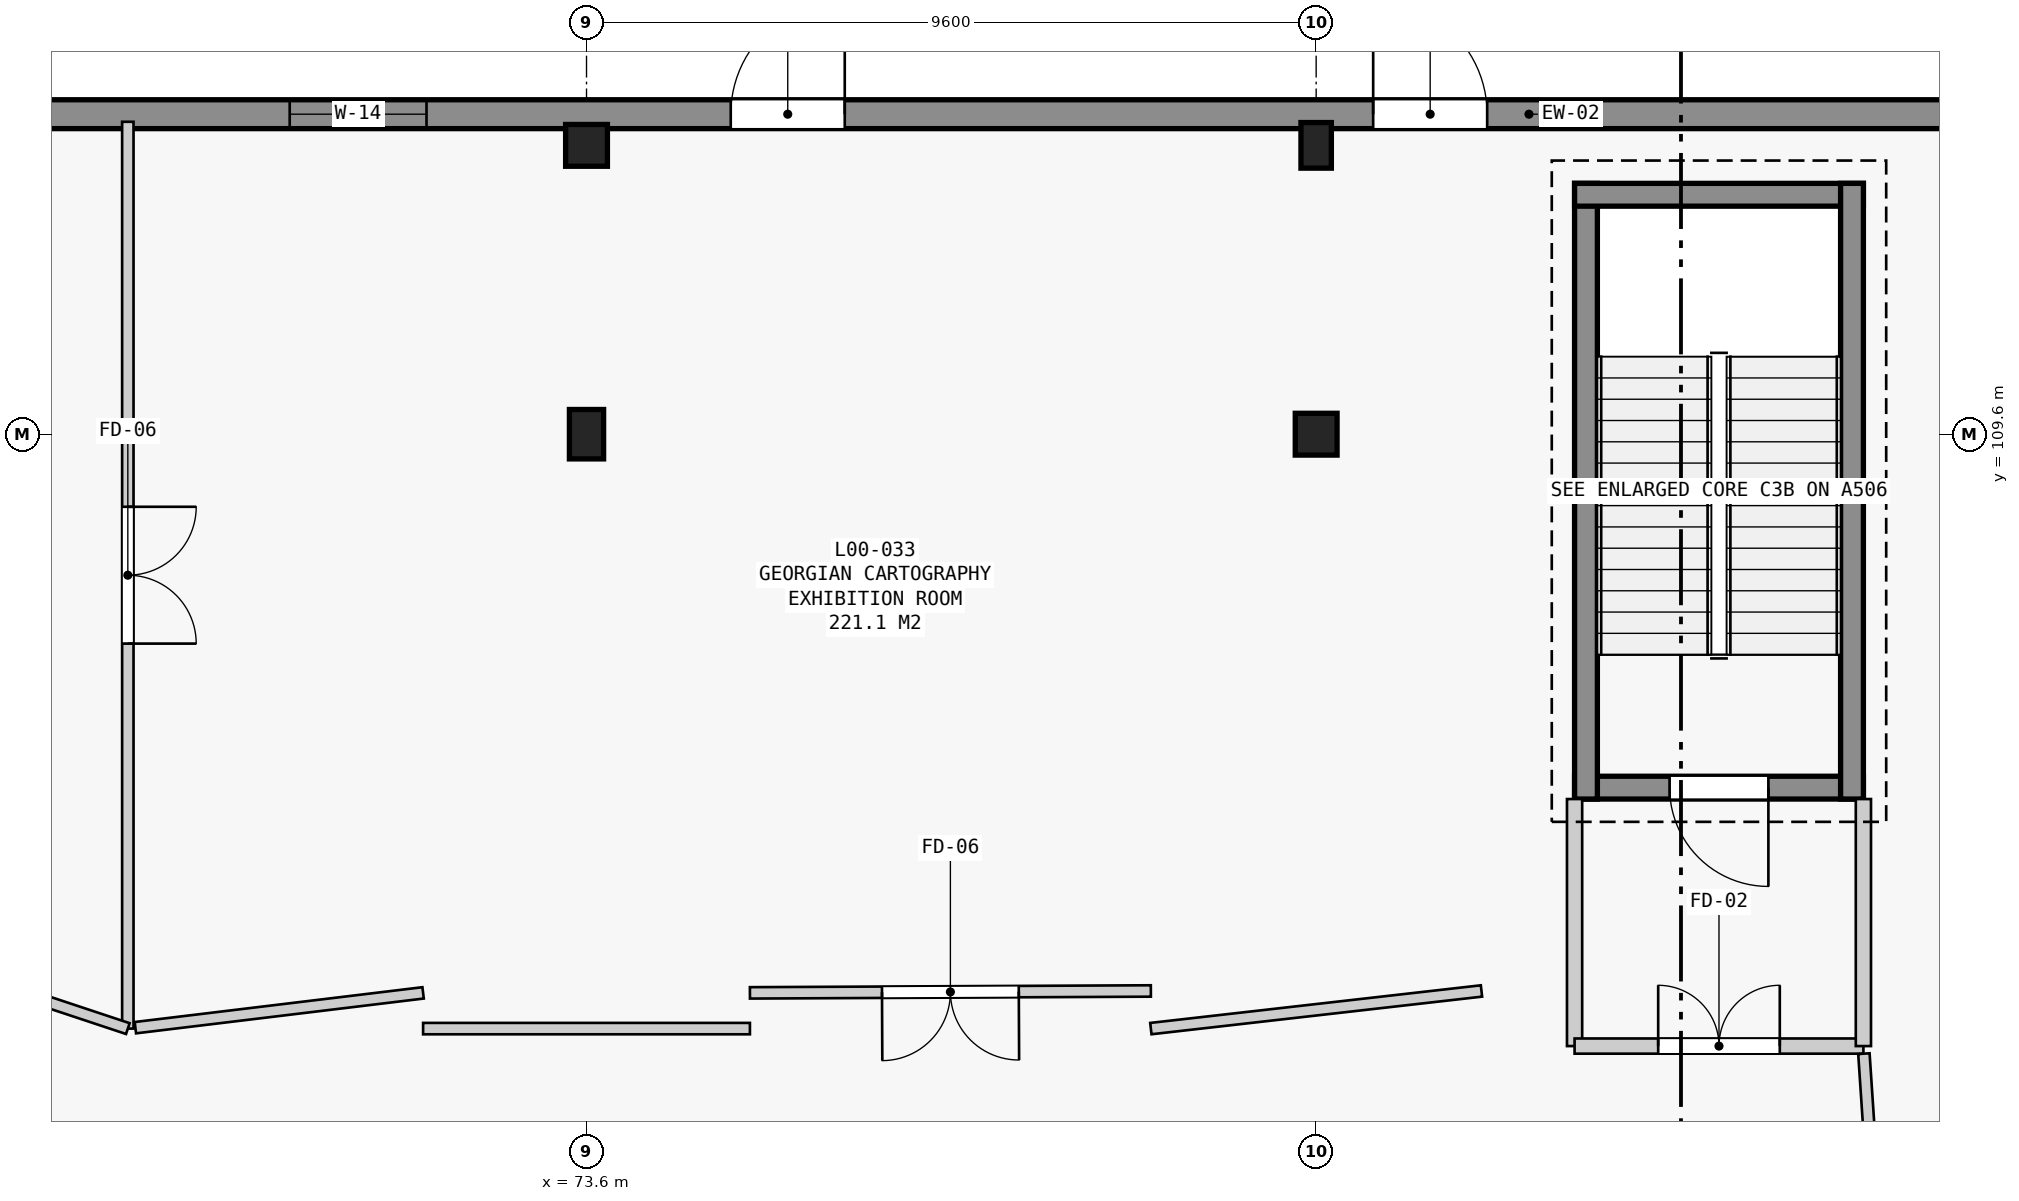
"""IFC4 building model, lengths in metres.
Left out: names, types, materials, properties, quantities, classifications, styles, units other than length and angle.
Written with IfcOpenShell. Run it as: python <this file> out.ifc"""

import sys

from ifc_helpers import new_model, si_unit, direction, frame, frame_2d, origin, origin_2d, place, context, subcontext, project, spatial, rectangle, extrude, element, fill, save


model = new_model("IFC4")
c1 = context("Model", 3, precision=1e-05, world=origin(), true_north=direction((0.0, 1.0)))
c2 = subcontext(c1, "Body", "Model", "MODEL_VIEW")
j1 = project(units=[si_unit("LENGTHUNIT", "METRE"), si_unit("PLANEANGLEUNIT", "RADIAN")], contexts=[c1])
p1 = place(None, origin())
s1 = spatial("IfcSite", under=j1, at=p1, CompositionType="ELEMENT")
p2 = place(p1, origin())
s2 = spatial("IfcBuilding", under=s1, at=p2, CompositionType="ELEMENT")
p3 = place(p2, origin())
s3 = spatial("IfcBuildingStorey", under=s2, at=p3, CompositionType="ELEMENT", Elevation=0.0)
p4 = place(p3, frame((73.6, 109.6, 0.0), z_axis=(0.0, 0.0, 1.0), x_axis=(1.0, 0.0, 0.0)))
e1 = element("IfcColumn", 1, at=p4, inside=s3, PredefinedType="COLUMN", context=c2, shape_type="SweptSolid", body=[
    extrude(rectangle(XDim=0.45, YDim=0.65, at=origin_2d()), origin(), (0.0, 0.0, 1.0), 5.4),
])
for number, where, z_axis, x_axis in (
    (2, (73.6, 113.4, 0.0), (0.0, 0.0, 1.0), (1.0, 0.0, 0.0)),
    (3, (83.2, 109.6, 0.0), (0.0, 0.0, 1.0), (1.0, 0.0, 0.0)),
):
    element("IfcColumn", number, at=place(p3, frame(where, z_axis=z_axis, x_axis=x_axis)), inside=s3, PredefinedType="COLUMN", context=c2, shape_type="SweptSolid", body=[
        extrude(rectangle(XDim=0.55, YDim=0.55, at=origin_2d()), origin(), (0.0, 0.0, 1.0), 5.4),
    ])
p5 = place(p3, frame((83.2, 113.4, 0.0), z_axis=(0.0, 0.0, 1.0), x_axis=(1.0, 0.0, 0.0)))
e4 = element("IfcColumn", 4, at=p5, inside=s3, PredefinedType="COLUMN", context=c2, shape_type="SweptSolid", body=[
    extrude(rectangle(XDim=0.4, YDim=0.6, at=origin_2d()), origin(), (0.0, 0.0, 1.0), 5.4),
])
p6 = place(p3, frame((46.29, 113.81, 0.0), z_axis=(0.0, 0.0, 1.0), x_axis=(1.0, 0.0, 0.0)))
e5 = element("IfcWall", 5, at=p6, inside=s3, PredefinedType="STANDARD", context=c2, shape_type="SweptSolid", body=[
    extrude(rectangle(XDim=84.72, YDim=0.38, at=frame_2d((42.36, 0.0))), origin(), (0.0, 0.0, 1.0), 5.12),
])
p7 = place(p6, frame((5.565, 0.0, 0.0)))
e6 = element("IfcOpeningElement", 6, at=p7, cuts=e5, PredefinedType="OPENING", context=c2, shape_type="SweptSolid", body=[
    extrude(rectangle(XDim=1.5, YDim=2.3, at=frame_2d((0.75, 1.15))), frame((0.0, 0.2, 0.0), z_axis=(0.0, -1.0, 0.0), x_axis=(1.0, 0.0, 0.0)), (0.0, 0.0, 1.0), 0.4),
])
p8 = place(p6, frame((29.208, 0.0, 0.0)))
e7 = element("IfcOpeningElement", 7, at=p8, cuts=e5, PredefinedType="OPENING", context=c2, shape_type="SweptSolid", body=[
    extrude(rectangle(XDim=1.5, YDim=2.3, at=frame_2d((0.75, 1.15))), frame((0.0, 0.2, 0.0), z_axis=(0.0, -1.0, 0.0), x_axis=(1.0, 0.0, 0.0)), (0.0, 0.0, 1.0), 0.4),
])
p9 = place(p6, frame((58.012, 0.0, 0.0)))
e8 = element("IfcOpeningElement", 8, at=p9, cuts=e5, PredefinedType="OPENING", context=c2, shape_type="SweptSolid", body=[
    extrude(rectangle(XDim=1.5, YDim=2.3, at=frame_2d((0.75, 1.15))), frame((0.0, 0.2, 0.0), z_axis=(0.0, -1.0, 0.0), x_axis=(1.0, 0.0, 0.0)), (0.0, 0.0, 1.0), 0.4),
])
p10 = place(p6, frame((23.405, 0.0, 1.05)))
e9 = element("IfcOpeningElement", 9, at=p10, cuts=e5, PredefinedType="OPENING", context=c2, shape_type="SweptSolid", body=[
    extrude(rectangle(XDim=1.8, YDim=2.1, at=frame_2d((0.9, 1.05))), frame((0.0, 0.2, 0.0), z_axis=(0.0, -1.0, 0.0), x_axis=(1.0, 0.0, 0.0)), (0.0, 0.0, 1.0), 0.4),
])
p11 = place(p6, frame((52.465, 0.0, 1.65)))
e10 = element("IfcOpeningElement", 10, at=p11, cuts=e5, PredefinedType="OPENING", context=c2, shape_type="SweptSolid", body=[
    extrude(rectangle(XDim=2.1, YDim=1.6, at=frame_2d((1.05, 0.8))), frame((0.0, 0.2, 0.0), z_axis=(0.0, -1.0, 0.0), x_axis=(1.0, 0.0, 0.0)), (0.0, 0.0, 1.0), 0.4),
])
p12 = place(p6, frame((11.66, 0.0, 0.0)))
e11 = element("IfcOpeningElement", 11, at=p12, cuts=e5, PredefinedType="OPENING", context=c2, shape_type="SweptSolid", body=[
    extrude(rectangle(XDim=1.5, YDim=2.3, at=frame_2d((0.75, 1.15))), frame((0.0, 0.2, 0.0), z_axis=(0.0, -1.0, 0.0), x_axis=(1.0, 0.0, 0.0)), (0.0, 0.0, 1.0), 0.4),
])
p13 = place(p6, frame((37.66, 0.0, 0.0)))
e12 = element("IfcOpeningElement", 12, at=p13, cuts=e5, PredefinedType="OPENING", context=c2, shape_type="SweptSolid", body=[
    extrude(rectangle(XDim=1.5, YDim=2.3, at=frame_2d((0.75, 1.15))), frame((0.0, 0.2, 0.0), z_axis=(0.0, -1.0, 0.0), x_axis=(1.0, 0.0, 0.0)), (0.0, 0.0, 1.0), 0.4),
])
p14 = place(p3, frame((90.4, 104.95, 0.0), z_axis=(0.0, 0.0, 1.0), x_axis=(-1.0, 0.0, 0.0)))
e13 = element("IfcWall", 13, at=p14, inside=s3, PredefinedType="SHEAR", context=c2, shape_type="SweptSolid", body=[
    extrude(rectangle(XDim=3.8, YDim=0.3, at=frame_2d((1.9, 0.0))), origin(), (0.0, 0.0, 1.0), 5.12),
])
p15 = place(p14, frame((1.25, 0.0, 0.0)))
e14 = element("IfcOpeningElement", 14, at=p15, cuts=e13, PredefinedType="OPENING", context=c2, shape_type="SweptSolid", body=[
    extrude(rectangle(XDim=1.3, YDim=2.2, at=frame_2d((0.65, 1.1))), frame((0.0, 0.16, 0.0), z_axis=(0.0, -1.0, 0.0), x_axis=(1.0, 0.0, 0.0)), (0.0, 0.0, 1.0), 0.32),
])
p16 = place(p3, frame((86.75, 104.8, 0.0), z_axis=(0.0, 0.0, 1.0), x_axis=(0.0, 1.0, 0.0)))
e15 = element("IfcWall", 15, at=p16, inside=s3, PredefinedType="SHEAR", context=c2, shape_type="SweptSolid", body=[
    extrude(rectangle(XDim=8.1, YDim=0.3, at=frame_2d((4.05, 0.0))), origin(), (0.0, 0.0, 1.0), 5.12),
])
p17 = place(p3, frame((86.6, 112.75, 0.0), z_axis=(0.0, 0.0, 1.0), x_axis=(1.0, 0.0, 0.0)))
e16 = element("IfcWall", 16, at=p17, inside=s3, PredefinedType="SHEAR", context=c2, shape_type="SweptSolid", body=[
    extrude(rectangle(XDim=3.8, YDim=0.3, at=frame_2d((1.9, 0.0))), origin(), (0.0, 0.0, 1.0), 5.12),
])
p18 = place(p3, frame((90.25, 112.9, 0.0), z_axis=(0.0, 0.0, 1.0), x_axis=(0.0, -1.0, 0.0)))
e17 = element("IfcWall", 17, at=p18, inside=s3, PredefinedType="SHEAR", context=c2, shape_type="SweptSolid", body=[
    extrude(rectangle(XDim=8.1, YDim=0.3, at=frame_2d((4.05, 0.0))), origin(), (0.0, 0.0, 1.0), 5.12),
])
p19 = place(p3, frame((86.6, 104.8, 0.0), z_axis=(0.0, 0.0, 1.0), x_axis=(0.0, -1.0, 0.0)))
e18 = element("IfcWall", 18, at=p19, inside=s3, PredefinedType="STANDARD", context=c2, shape_type="SweptSolid", body=[
    extrude(rectangle(XDim=3.25, YDim=0.2, at=frame_2d((1.625, 0.0))), origin(), (0.0, 0.0, 1.0), 5.12),
])
p20 = place(p3, frame((86.6, 101.55, 0.0), z_axis=(0.0, 0.0, 1.0), x_axis=(1.0, 0.0, 0.0)))
e19 = element("IfcWall", 19, at=p20, inside=s3, PredefinedType="STANDARD", context=c2, shape_type="SweptSolid", body=[
    extrude(rectangle(XDim=3.8, YDim=0.2, at=frame_2d((1.9, 0.0))), origin(), (0.0, 0.0, 1.0), 5.12),
])
p21 = place(p20, frame((1.1, 0.0, 0.0)))
e20 = element("IfcOpeningElement", 20, at=p21, cuts=e19, PredefinedType="OPENING", context=c2, shape_type="SweptSolid", body=[
    extrude(rectangle(XDim=1.6, YDim=2.2, at=frame_2d((0.8, 1.1))), frame((0.0, 0.11, 0.0), z_axis=(0.0, -1.0, 0.0), x_axis=(1.0, 0.0, 0.0)), (0.0, 0.0, 1.0), 0.22),
])
p22 = place(p3, frame((90.4, 101.55, 0.0), z_axis=(0.0, 0.0, 1.0), x_axis=(0.0, 1.0, 0.0)))
e21 = element("IfcWall", 21, at=p22, inside=s3, PredefinedType="STANDARD", context=c2, shape_type="SweptSolid", body=[
    extrude(rectangle(XDim=3.25, YDim=0.2, at=frame_2d((1.625, 0.0))), origin(), (0.0, 0.0, 1.0), 5.12),
])
p23 = place(p3, frame((67.565, 113.71, 0.0), z_axis=(0.0, 0.0, 1.0), x_axis=(0.0, -1.0, 0.0)))
e22 = element("IfcWall", 22, at=p23, inside=s3, PredefinedType="PARTITIONING", context=c2, shape_type="SweptSolid", body=[
    extrude(rectangle(XDim=11.93, YDim=0.15, at=frame_2d((5.965, 0.0))), origin(), (0.0, 0.0, 1.0), 2.715),
])
p24 = place(p23, frame((5.065, 0.0, 0.0)))
e23 = element("IfcOpeningElement", 23, at=p24, cuts=e22, PredefinedType="OPENING", context=c2, shape_type="SweptSolid", body=[
    extrude(rectangle(XDim=1.8, YDim=2.2, at=frame_2d((0.9, 1.1))), frame((0.0, 0.085, 0.0), z_axis=(0.0, -1.0, 0.0), x_axis=(1.0, 0.0, 0.0)), (0.0, 0.0, 1.0), 0.17),
])
p25 = place(p3, frame((67.565, 101.78, 0.0), z_axis=(0.0, 0.0, 1.0), x_axis=(-0.949011343134, 0.315241923931, 0.0)))
e24 = element("IfcWall", 24, at=p25, inside=s3, PredefinedType="PARTITIONING", context=c2, shape_type="SweptSolid", body=[
    extrude(rectangle(XDim=1.412, YDim=0.15, at=frame_2d((0.706, 0.0))), origin(), (0.0, 0.0, 1.0), 5.12),
])
p26 = place(p3, frame((85.375, 102.275, 0.0), z_axis=(0.0, 0.0, 1.0), x_axis=(-0.993591313496, -0.113032303988, 0.0)))
e25 = element("IfcWall", 25, at=p26, inside=s3, PredefinedType="PARTITIONING", context=c2, shape_type="SweptSolid", body=[
    extrude(rectangle(XDim=4.378, YDim=0.15, at=frame_2d((2.189, 0.0))), origin(), (0.0, 0.0, 1.0), 4.45),
])
p27 = place(p3, frame((81.025, 102.275, 0.0), z_axis=(0.0, 0.0, 1.0), x_axis=(-0.999988856687, -0.004720858252, 0.0)))
e26 = element("IfcWall", 26, at=p27, inside=s3, PredefinedType="PARTITIONING", context=c2, shape_type="SweptSolid", body=[
    extrude(rectangle(XDim=5.275, YDim=0.15, at=frame_2d((2.637, 0.0))), origin(), (0.0, 0.0, 1.0), 4.65),
])
p28 = place(p27, frame((1.738, 0.0, 0.0)))
e27 = element("IfcOpeningElement", 27, at=p28, cuts=e26, PredefinedType="OPENING", context=c2, shape_type="SweptSolid", body=[
    extrude(rectangle(XDim=1.8, YDim=2.2, at=frame_2d((0.9, 1.1))), frame((0.0, 0.085, 0.0), z_axis=(0.0, -1.0, 0.0), x_axis=(1.0, 0.0, 0.0)), (0.0, 0.0, 1.0), 0.17),
])
p29 = place(p3, frame((75.75, 101.78, 0.0), z_axis=(0.0, 0.0, 1.0), x_axis=(-1.0, 0.0, 0.0)))
e28 = element("IfcWall", 28, at=p29, inside=s3, PredefinedType="PARTITIONING", context=c2, shape_type="SweptSolid", body=[
    extrude(rectangle(XDim=4.3, YDim=0.15, at=frame_2d((2.15, 0.0))), origin(), (0.0, 0.0, 1.0), 4.4),
])
p30 = place(p3, frame((71.45, 102.25, 0.0), z_axis=(0.0, 0.0, 1.0), x_axis=(-0.992760641665, -0.120109568152, 0.0)))
e29 = element("IfcWall", 29, at=p30, inside=s3, PredefinedType="PARTITIONING", context=c2, shape_type="SweptSolid", body=[
    extrude(rectangle(XDim=3.813, YDim=0.15, at=frame_2d((1.907, 0.0))), origin(), (0.0, 0.0, 1.0), 5.12),
])
p31 = place(p3, frame((90.6, 98.55, 0.0), z_axis=(0.0, 0.0, 1.0), x_axis=(-0.066524585458, 0.997784786179, 0.0)))
e30 = element("IfcWall", 30, at=p31, inside=s3, PredefinedType="PARTITIONING", context=c2, shape_type="SweptSolid", body=[
    extrude(rectangle(XDim=2.906, YDim=0.15, at=frame_2d((1.453, 0.0))), origin(), (0.0, 0.0, 1.0), 4.45),
])
p32 = place(p8, origin())
e31 = element("IfcDoor", 31, at=p32, inside=s3, OperationType="SINGLE_SWING_RIGHT", PredefinedType="DOOR", context=c2, shape_type="SweptSolid", body=[
    extrude(rectangle(XDim=1.5, YDim=2.3, at=frame_2d((0.75, 1.15))), frame((0.0, 0.025, 0.0), z_axis=(0.0, -1.0, 0.0), x_axis=(1.0, 0.0, 0.0)), (0.0, 0.0, 1.0), 0.05),
])
fill(e7, e31)
p33 = place(p10, origin())
e32 = element("IfcWindow", 32, at=p33, inside=s3, PartitioningType="SINGLE_PANEL", PredefinedType="WINDOW", context=c2, shape_type="SweptSolid", body=[
    extrude(rectangle(XDim=1.8, YDim=2.1, at=frame_2d((0.9, 1.05))), frame((0.0, 0.03, 0.0), z_axis=(0.0, -1.0, 0.0), x_axis=(1.0, 0.0, 0.0)), (0.0, 0.0, 1.0), 0.06),
])
fill(e9, e32)
p34 = place(p13, origin())
e33 = element("IfcDoor", 33, at=p34, inside=s3, OperationType="SINGLE_SWING_LEFT", PredefinedType="DOOR", context=c2, shape_type="SweptSolid", body=[
    extrude(rectangle(XDim=1.5, YDim=2.3, at=frame_2d((0.75, 1.15))), frame((0.0, 0.025, 0.0), z_axis=(0.0, -1.0, 0.0), x_axis=(1.0, 0.0, 0.0)), (0.0, 0.0, 1.0), 0.05),
])
fill(e12, e33)
p35 = place(p15, origin())
e34 = element("IfcDoor", 34, at=p35, inside=s3, OperationType="SINGLE_SWING_LEFT", PredefinedType="DOOR", context=c2, shape_type="SweptSolid", body=[
    extrude(rectangle(XDim=1.3, YDim=2.2, at=frame_2d((0.65, 1.1))), frame((0.0, 0.025, 0.0), z_axis=(0.0, -1.0, 0.0), x_axis=(1.0, 0.0, 0.0)), (0.0, 0.0, 1.0), 0.05),
])
fill(e14, e34)
p36 = place(p21, origin())
e35 = element("IfcDoor", 35, at=p36, inside=s3, OperationType="DOUBLE_DOOR_SINGLE_SWING", PredefinedType="DOOR", context=c2, shape_type="SweptSolid", body=[
    extrude(rectangle(XDim=1.6, YDim=2.2, at=frame_2d((0.8, 1.1))), frame((0.0, 0.025, 0.0), z_axis=(0.0, -1.0, 0.0), x_axis=(1.0, 0.0, 0.0)), (0.0, 0.0, 1.0), 0.05),
])
fill(e20, e35)
p37 = place(p24, origin())
e36 = element("IfcDoor", 36, at=p37, inside=s3, OperationType="DOUBLE_DOOR_SINGLE_SWING", PredefinedType="DOOR", context=c2, shape_type="SweptSolid", body=[
    extrude(rectangle(XDim=1.8, YDim=2.2, at=frame_2d((0.9, 1.1))), frame((0.0, 0.025, 0.0), z_axis=(0.0, -1.0, 0.0), x_axis=(1.0, 0.0, 0.0)), (0.0, 0.0, 1.0), 0.05),
])
fill(e23, e36)
p38 = place(p28, origin())
e37 = element("IfcDoor", 37, at=p38, inside=s3, OperationType="DOUBLE_DOOR_SINGLE_SWING", PredefinedType="DOOR", context=c2, shape_type="SweptSolid", body=[
    extrude(rectangle(XDim=1.8, YDim=2.2, at=frame_2d((0.9, 1.1))), frame((0.0, 0.025, 0.0), z_axis=(0.0, -1.0, 0.0), x_axis=(1.0, 0.0, 0.0)), (0.0, 0.0, 1.0), 0.05),
])
fill(e27, e37)
save(model, sys.argv[1])
